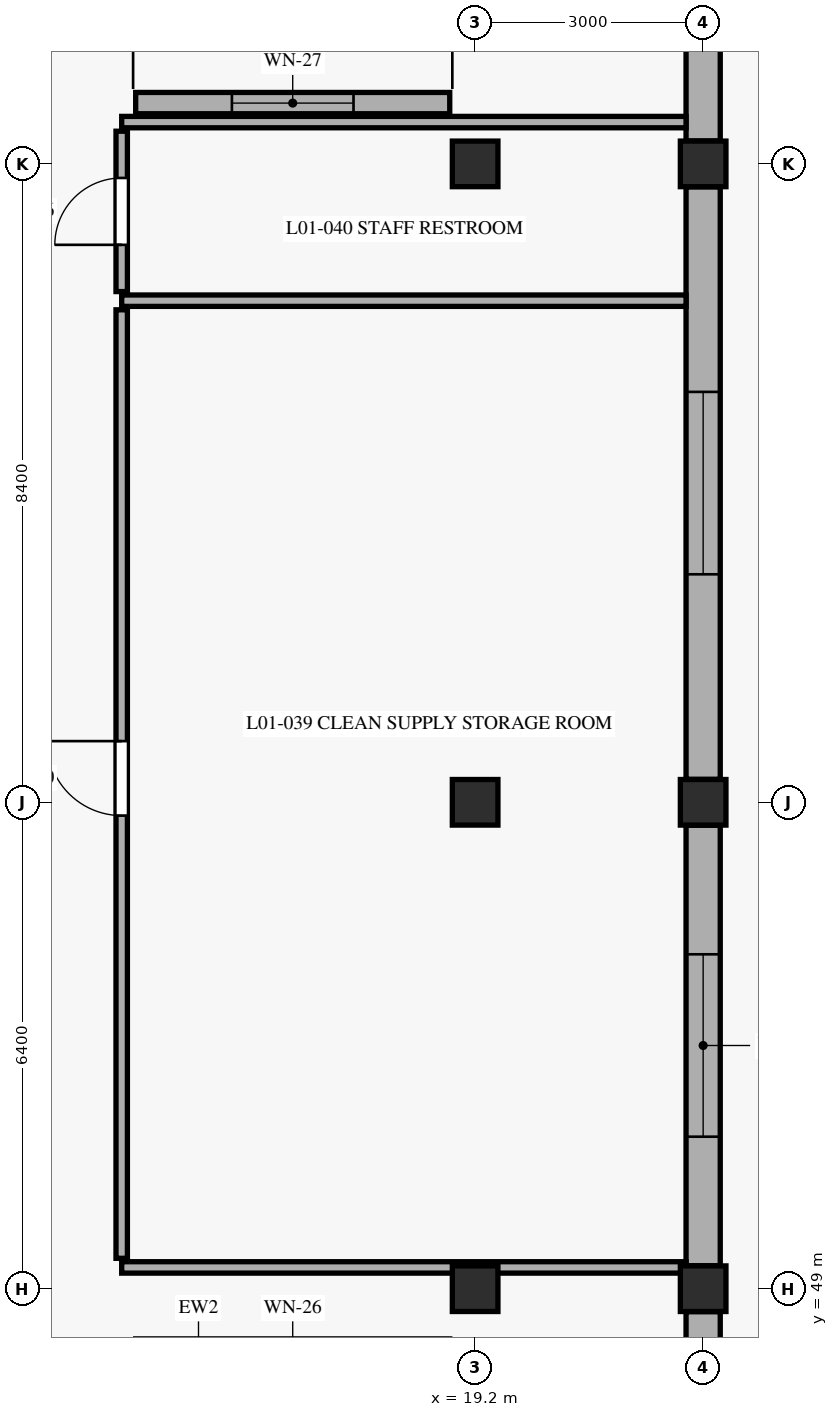
"""IFC4 building model, lengths in metres.
Left out: names, types, materials, properties, quantities, classifications, styles, units other than length and angle.
Written with IfcOpenShell. Run it as: python <this file> out.ifc"""

import sys

from ifc_helpers import new_model, si_unit, direction, frame, frame_2d, origin, origin_with_axes, origin_2d, place, context, subcontext, project, spatial, rectangle, extrude, element, fill, save


model = new_model("IFC4")
c1 = context("Model", 3, precision=1e-05, world=origin(), true_north=direction((0.0, 1.0)))
c2 = subcontext(c1, "Body", "Model", "MODEL_VIEW")
j1 = project(units=[si_unit("LENGTHUNIT", "METRE"), si_unit("PLANEANGLEUNIT", "RADIAN")], contexts=[c1])
p1 = place(None, origin())
s1 = spatial("IfcSite", under=j1, at=p1, CompositionType="ELEMENT")
p2 = place(p1, origin())
s2 = spatial("IfcBuilding", under=s1, at=p2, CompositionType="ELEMENT")
p3 = place(p2, origin())
s3 = spatial("IfcBuildingStorey", under=s2, at=p3, CompositionType="ELEMENT", Elevation=0.0)
for number, where, z_axis, x_axis in (
    (1, (19.2, 49.0, 0.0), (0.0, 0.0, 1.0), (1.0, 0.0, 0.0)),
    (2, (19.2, 55.4, 0.0), (0.0, 0.0, 1.0), (1.0, 0.0, 0.0)),
    (3, (19.2, 63.8, 0.0), (0.0, 0.0, 1.0), (1.0, 0.0, 0.0)),
    (4, (22.2, 49.0, 0.0), (0.0, 0.0, 1.0), (1.0, 0.0, 0.0)),
    (5, (22.2, 55.4, 0.0), (0.0, 0.0, 1.0), (1.0, 0.0, 0.0)),
    (6, (22.2, 63.8, 0.0), (0.0, 0.0, 1.0), (1.0, 0.0, 0.0)),
):
    element("IfcColumn", number, at=place(p3, frame(where, z_axis=z_axis, x_axis=x_axis)), inside=s3, PredefinedType="COLUMN", context=c2, shape_type="SweptSolid", body=[
        extrude(rectangle(XDim=0.6, YDim=0.6, at=origin_2d()), origin(), (0.0, 0.0, 1.0), 4.8),
    ])
p4 = place(p3, frame((22.2, 42.902, 0.0), z_axis=(0.0, 0.0, 1.0), x_axis=(0.0, 1.0, 0.0)))
e7 = element("IfcWall", 7, at=p4, inside=s3, PredefinedType="SOLIDWALL", context=c2, shape_type="SweptSolid", body=[
    extrude(rectangle(XDim=5.796, YDim=0.45, at=frame_2d((2.898, 0.0))), origin(), (0.0, 0.0, 1.0), 4.09),
])
p5 = place(p4, frame((1.968, 0.0, 0.0)))
e8 = element("IfcOpeningElement", 8, at=p5, cuts=e7, PredefinedType="OPENING", context=c2, shape_type="SweptSolid", body=[
    extrude(rectangle(XDim=1.86, YDim=2.5, at=frame_2d((0.93, 1.25))), frame((0.0, 0.235, 0.0), z_axis=(0.0, -1.0, 0.0), x_axis=(1.0, 0.0, 0.0)), (0.0, 0.0, 1.0), 0.47),
])
p6 = place(p3, frame((22.2, 49.302, 0.0), z_axis=(0.0, 0.0, 1.0), x_axis=(0.0, 1.0, 0.0)))
e9 = element("IfcWall", 9, at=p6, inside=s3, PredefinedType="SOLIDWALL", context=c2, shape_type="SweptSolid", body=[
    extrude(rectangle(XDim=5.796, YDim=0.45, at=frame_2d((2.898, 0.0))), origin(), (0.0, 0.0, 1.0), 4.04),
])
p7 = place(p6, frame((1.698, 0.0, 0.6)))
e10 = element("IfcOpeningElement", 10, at=p7, cuts=e9, PredefinedType="OPENING", context=c2, shape_type="SweptSolid", body=[
    extrude(rectangle(XDim=2.4, YDim=2.5, at=frame_2d((1.2, 1.25))), frame((0.0, 0.235, 0.0), z_axis=(0.0, -1.0, 0.0), x_axis=(1.0, 0.0, 0.0)), (0.0, 0.0, 1.0), 0.47),
])
p8 = place(p3, frame((22.2, 55.702, 0.0), z_axis=(0.0, 0.0, 1.0), x_axis=(0.0, 1.0, 0.0)))
e11 = element("IfcWall", 11, at=p8, inside=s3, PredefinedType="SOLIDWALL", context=c2, shape_type="SweptSolid", body=[
    extrude(rectangle(XDim=7.796, YDim=0.45, at=frame_2d((3.898, 0.0))), origin(), (0.0, 0.0, 1.0), 4.04),
])
p9 = place(p8, frame((2.698, 0.0, 0.6)))
e12 = element("IfcOpeningElement", 12, at=p9, cuts=e11, PredefinedType="OPENING", context=c2, shape_type="SweptSolid", body=[
    extrude(rectangle(XDim=2.4, YDim=2.5, at=frame_2d((1.2, 1.25))), frame((0.0, 0.235, 0.0), z_axis=(0.0, -1.0, 0.0), x_axis=(1.0, 0.0, 0.0)), (0.0, 0.0, 1.0), 0.47),
])
p10 = place(p3, frame((22.2, 64.102, 0.0), z_axis=(0.0, 0.0, 1.0), x_axis=(0.0, 1.0, 0.0)))
e13 = element("IfcWall", 13, at=p10, inside=s3, PredefinedType="SOLIDWALL", context=c2, shape_type="SweptSolid", body=[
    extrude(rectangle(XDim=7.796, YDim=0.45, at=frame_2d((3.898, 0.0))), origin(), (0.0, 0.0, 1.0), 4.04),
])
p11 = place(p10, frame((2.698, 0.0, 0.6)))
e14 = element("IfcOpeningElement", 14, at=p11, cuts=e13, PredefinedType="OPENING", context=c2, shape_type="SweptSolid", body=[
    extrude(rectangle(XDim=2.4, YDim=2.5, at=frame_2d((1.2, 1.25))), frame((0.0, 0.235, 0.0), z_axis=(0.0, -1.0, 0.0), x_axis=(1.0, 0.0, 0.0)), (0.0, 0.0, 1.0), 0.47),
])
p12 = place(p3, frame((18.866, 64.6, 0.0), z_axis=(0.0, 0.0, 1.0), x_axis=(-1.0, 0.0, 0.0)))
e15 = element("IfcWall", 15, at=p12, inside=s3, PredefinedType="SOLIDWALL", context=c2, shape_type="SweptSolid", body=[
    extrude(rectangle(XDim=4.132, YDim=0.28, at=frame_2d((2.066, 0.0))), origin(), (0.0, 0.0, 1.0), 4.5),
])
p13 = place(p12, frame((1.266, 0.0, 0.85)))
e16 = element("IfcOpeningElement", 16, at=p13, cuts=e15, PredefinedType="OPENING", context=c2, shape_type="SweptSolid", body=[
    extrude(rectangle(XDim=1.6, YDim=1.8, at=frame_2d((0.8, 0.9))), frame((0.0, 0.15, 0.0), z_axis=(0.0, -1.0, 0.0), x_axis=(1.0, 0.0, 0.0)), (0.0, 0.0, 1.0), 0.3),
])
p14 = place(p3, frame((14.55, 49.4, 0.0), z_axis=(0.0, 0.0, 1.0), x_axis=(0.0, 1.0, 0.0)))
e17 = element("IfcWall", 17, at=p14, inside=s3, PredefinedType="PARTITIONING", context=c2, shape_type="SweptSolid", body=[
    extrude(rectangle(XDim=12.48, YDim=0.15, at=frame_2d((6.24, 0.0))), origin(), (0.0, 0.0, 1.0), 4.095),
])
p15 = place(p14, frame((5.825, 0.0, 0.0)))
e18 = element("IfcOpeningElement", 18, at=p15, cuts=e17, PredefinedType="OPENING", context=c2, shape_type="SweptSolid", body=[
    extrude(rectangle(XDim=0.98, YDim=2.12, at=frame_2d((0.49, 1.06))), frame((0.0, 0.085, 0.0), z_axis=(0.0, -1.0, 0.0), x_axis=(1.0, 0.0, 0.0)), (0.0, 0.0, 1.0), 0.17),
])
p16 = place(p3, frame((14.55, 49.28, 0.0), z_axis=(0.0, 0.0, 1.0), x_axis=(1.0, 0.0, 0.0)))
e19 = element("IfcWall", 19, at=p16, inside=s3, PredefinedType="PARTITIONING", context=c2, shape_type="SweptSolid", body=[
    extrude(rectangle(XDim=7.425, YDim=0.15, at=frame_2d((3.712, 0.0))), origin(), (0.0, 0.0, 1.0), 3.895),
])
p17 = place(p3, frame((14.55, 62.0, 0.0), z_axis=(0.0, 0.0, 1.0), x_axis=(1.0, 0.0, 0.0)))
e20 = element("IfcWall", 20, at=p17, inside=s3, PredefinedType="PARTITIONING", context=c2, shape_type="SweptSolid", body=[
    extrude(rectangle(XDim=7.425, YDim=0.15, at=frame_2d((3.712, 0.0))), origin(), (0.0, 0.0, 1.0), 3.975),
])
p18 = place(p3, frame((14.55, 62.12, 0.0), z_axis=(0.0, 0.0, 1.0), x_axis=(0.0, 1.0, 0.0)))
e21 = element("IfcWall", 21, at=p18, inside=s3, PredefinedType="PARTITIONING", context=c2, shape_type="SweptSolid", body=[
    extrude(rectangle(XDim=2.11, YDim=0.15, at=frame_2d((1.055, 0.0))), origin(), (0.0, 0.0, 1.0), 4.095),
])
p19 = place(p18, frame((0.615, 0.0, 0.0)))
e22 = element("IfcOpeningElement", 22, at=p19, cuts=e21, PredefinedType="OPENING", context=c2, shape_type="SweptSolid", body=[
    extrude(rectangle(XDim=0.88, YDim=2.1, at=frame_2d((0.44, 1.05))), frame((0.0, 0.085, 0.0), z_axis=(0.0, -1.0, 0.0), x_axis=(1.0, 0.0, 0.0)), (0.0, 0.0, 1.0), 0.17),
])
p20 = place(p3, frame((14.55, 64.35, 0.0), z_axis=(0.0, 0.0, 1.0), x_axis=(1.0, 0.0, 0.0)))
e23 = element("IfcWall", 23, at=p20, inside=s3, PredefinedType="PARTITIONING", context=c2, shape_type="SweptSolid", body=[
    extrude(rectangle(XDim=7.425, YDim=0.15, at=frame_2d((3.712, 0.0))), origin(), (0.0, 0.0, 1.0), 3.975),
])
p21 = place(p7, origin_with_axes())
e24 = element("IfcWindow", 24, at=p21, inside=s3, PartitioningType="SINGLE_PANEL", PredefinedType="WINDOW", context=c2, shape_type="SweptSolid", body=[
    extrude(rectangle(XDim=2.4, YDim=2.5, at=frame_2d((1.2, 1.25))), frame((0.0, 0.03, 0.0), z_axis=(0.0, -1.0, 0.0), x_axis=(1.0, 0.0, 0.0)), (0.0, 0.0, 1.0), 0.06),
])
fill(e10, e24)
p22 = place(p9, origin_with_axes())
e25 = element("IfcWindow", 25, at=p22, inside=s3, PartitioningType="SINGLE_PANEL", PredefinedType="WINDOW", context=c2, shape_type="SweptSolid", body=[
    extrude(rectangle(XDim=2.4, YDim=2.5, at=frame_2d((1.2, 1.25))), frame((0.0, 0.03, 0.0), z_axis=(0.0, -1.0, 0.0), x_axis=(1.0, 0.0, 0.0)), (0.0, 0.0, 1.0), 0.06),
])
fill(e12, e25)
p23 = place(p13, origin_with_axes())
e26 = element("IfcWindow", 26, at=p23, inside=s3, PartitioningType="SINGLE_PANEL", PredefinedType="WINDOW", context=c2, shape_type="SweptSolid", body=[
    extrude(rectangle(XDim=1.6, YDim=1.8, at=frame_2d((0.8, 0.9))), frame((0.0, 0.03, 0.0), z_axis=(0.0, -1.0, 0.0), x_axis=(1.0, 0.0, 0.0)), (0.0, 0.0, 1.0), 0.06),
])
fill(e16, e26)
p24 = place(p15, frame((0.98, 0.0, 0.0), z_axis=(0.0, 0.0, 1.0), x_axis=(-1.0, 0.0, 0.0)))
e27 = element("IfcDoor", 27, at=p24, inside=s3, OperationType="SINGLE_SWING_LEFT", PredefinedType="DOOR", context=c2, shape_type="SweptSolid", body=[
    extrude(rectangle(XDim=0.98, YDim=2.12, at=frame_2d((0.49, 1.06))), frame((0.0, 0.025, 0.0), z_axis=(0.0, -1.0, 0.0), x_axis=(1.0, 0.0, 0.0)), (0.0, 0.0, 1.0), 0.05),
])
fill(e18, e27)
p25 = place(p19, frame((0.88, 0.0, 0.0), z_axis=(0.0, 0.0, 1.0), x_axis=(-1.0, 0.0, 0.0)))
e28 = element("IfcDoor", 28, at=p25, inside=s3, OperationType="SINGLE_SWING_RIGHT", PredefinedType="DOOR", context=c2, shape_type="SweptSolid", body=[
    extrude(rectangle(XDim=0.88, YDim=2.1, at=frame_2d((0.44, 1.05))), frame((0.0, 0.025, 0.0), z_axis=(0.0, -1.0, 0.0), x_axis=(1.0, 0.0, 0.0)), (0.0, 0.0, 1.0), 0.05),
])
fill(e22, e28)
save(model, sys.argv[1])
